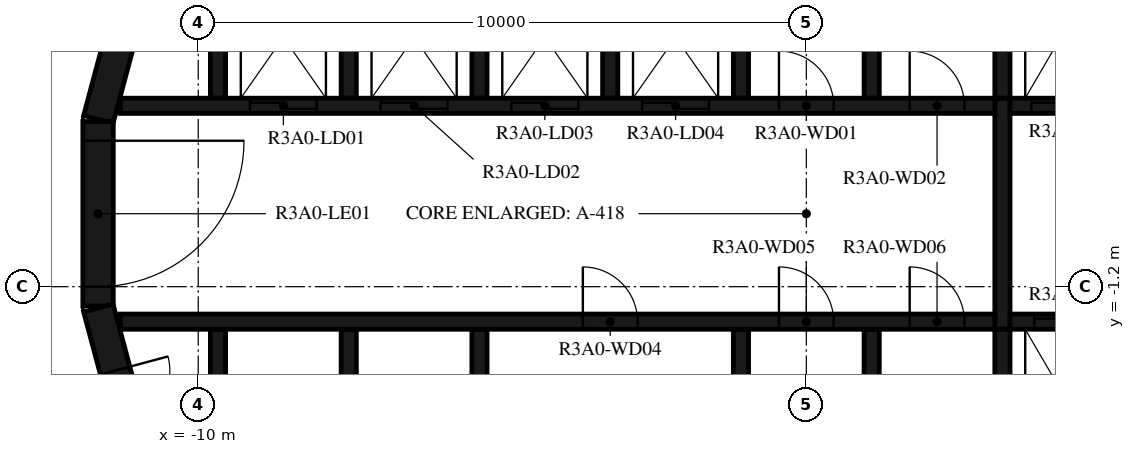
"""IFC4 building model, lengths in metres.
Left out: names, types, materials, properties, quantities, classifications, styles, units other than length and angle.
Written with IfcOpenShell. Run it as: python <this file> out.ifc"""

import sys

from ifc_helpers import new_model, si_unit, direction, frame, frame_2d, origin, place, context, subcontext, project, spatial, polyline, rectangle, outline, extrude, element, fill, save


model = new_model("IFC4")
c1 = context("Model", 3, precision=1e-05, world=origin(), true_north=direction((0.0, 1.0)))
c2 = subcontext(c1, "Body", "Model", "MODEL_VIEW")
j1 = project(units=[si_unit("LENGTHUNIT", "METRE"), si_unit("PLANEANGLEUNIT", "RADIAN")], contexts=[c1])
p1 = place(None, origin())
s1 = spatial("IfcSite", under=j1, at=p1, CompositionType="ELEMENT")
p2 = place(p1, origin())
s2 = spatial("IfcBuilding", under=s1, at=p2, CompositionType="ELEMENT")
p3 = place(p2, frame((0.0, 0.0, 120.4)))
s3 = spatial("IfcBuildingStorey", under=s2, at=p3, CompositionType="ELEMENT", Elevation=120.4)
p4 = place(p3, frame((-10.858, 4.479, 0.0), z_axis=(0.0, 0.0, 1.0), x_axis=(-0.258734743916, -0.965948410781, 0.0)))
e1 = element("IfcWall", 1, at=p4, inside=s3, PredefinedType="SHEAR", context=c2, shape_type="SweptSolid", body=[
    extrude(rectangle(XDim=3.033, YDim=0.5, at=frame_2d((1.516, 0.0))), origin(), (0.0, 0.0, 1.0), 3.12),
])
p5 = place(p3, frame((-11.647, 1.516, 0.0), z_axis=(0.0, 0.0, 1.0), x_axis=(0.0, -1.0, 0.0)))
e2 = element("IfcWall", 2, at=p5, inside=s3, PredefinedType="SHEAR", context=c2, shape_type="SweptSolid", body=[
    extrude(rectangle(XDim=3.033, YDim=0.5, at=frame_2d((1.516, 0.0))), origin(), (0.0, 0.0, 1.0), 3.12),
])
p6 = place(p5, frame((0.316, 0.0, 0.0)))
e3 = element("IfcOpeningElement", 3, at=p6, cuts=e2, PredefinedType="OPENING", context=c2, shape_type="SweptSolid", body=[
    extrude(rectangle(XDim=2.4, YDim=2.1, at=frame_2d((1.2, 1.05))), frame((0.0, 0.26, 0.0), z_axis=(0.0, -1.0, 0.0), x_axis=(1.0, 0.0, 0.0)), (0.0, 0.0, 1.0), 0.52),
])
p7 = place(p3, frame((-11.643, -1.55, 0.0), z_axis=(0.0, 0.0, 1.0), x_axis=(0.258734743916, -0.965948410781, 0.0)))
e4 = element("IfcWall", 4, at=p7, inside=s3, PredefinedType="SHEAR", context=c2, shape_type="SweptSolid", body=[
    extrude(rectangle(XDim=3.033, YDim=0.5, at=frame_2d((1.516, 0.0))), origin(), (0.0, 0.0, 1.0), 3.12),
])
p8 = place(p7, frame((1.066, 0.0, 0.0)))
e5 = element("IfcOpeningElement", 5, at=p8, cuts=e4, PredefinedType="OPENING", context=c2, shape_type="SweptSolid", body=[
    extrude(rectangle(XDim=0.9, YDim=2.1, at=frame_2d((0.45, 1.05))), frame((0.0, 0.26, 0.0), z_axis=(0.0, -1.0, 0.0), x_axis=(1.0, 0.0, 0.0)), (0.0, 0.0, 1.0), 0.52),
])
p9 = place(p3, origin())
e6 = element("IfcWall", 6, at=p9, inside=s3, PredefinedType="SHEAR", context=c2, shape_type="SweptSolid", body=[
    extrude(outline(polyline([(-9.55, 4.8), (-7.65, 4.8), (-7.65, 1.9), (-7.4, 1.9), (-7.4, 4.8), (-5.5, 4.8), (-5.5, 1.9), (-5.25, 1.9), (-5.25, 4.8), (-3.35, 4.8), (-3.35, 1.9), (-3.1, 1.9), (-3.1, 4.8), (-1.2, 4.8), (-1.2, 1.9), (-0.95, 1.9), (-0.95, 4.8), (0.95, 4.8), (0.95, 1.9), (1.2, 1.9), (1.2, 4.8), (3.1, 4.8), (3.1, 1.9), (3.35, 1.9), (3.35, 4.8), (5.25, 4.8), (5.25, 1.9), (5.5, 1.9), (5.5, 4.8), (7.4, 4.8), (7.4, 1.9), (7.65, 1.9), (7.65, 4.8), (9.55, 4.8), (9.55, 1.9), (9.8, 1.9), (9.8, 4.8), (9.8, 5.05), (-9.8, 5.05), (-9.8, 4.8), (-9.8, 1.9), (-9.55, 1.9), (-9.55, 4.8)])), origin(), (0.0, 0.0, 1.0), 3.12),
])
p10 = place(p3, origin())
e7 = element("IfcWall", 7, at=p10, inside=s3, PredefinedType="SHEAR", context=c2, shape_type="SweptSolid", body=[
    extrude(outline(polyline([(9.8, -5.05), (9.8, -4.8), (9.8, -1.9), (9.55, -1.9), (9.55, -4.8), (7.65, -4.8), (7.65, -1.9), (7.4, -1.9), (7.4, -4.8), (5.5, -4.8), (5.5, -1.9), (5.25, -1.9), (5.25, -4.8), (3.35, -4.8), (3.35, -1.9), (3.1, -1.9), (3.1, -4.8), (1.2, -4.8), (1.2, -1.9), (0.95, -1.9), (0.95, -4.8), (-0.95, -4.8), (-0.95, -1.9), (-1.2, -1.9), (-1.2, -4.8), (-5.25, -4.8), (-5.25, -1.9), (-5.5, -1.9), (-5.5, -4.8), (-7.4, -4.8), (-7.4, -1.9), (-7.65, -1.9), (-7.65, -4.8), (-9.55, -4.8), (-9.55, -1.9), (-9.8, -1.9), (-9.8, -4.8), (-9.8, -5.05), (9.8, -5.05)])), origin(), (0.0, 0.0, 1.0), 3.12),
])
p11 = place(p3, frame((-11.28, 1.775, 0.0), z_axis=(0.0, 0.0, 1.0), x_axis=(1.0, 0.0, 0.0)))
e8 = element("IfcWall", 8, at=p11, inside=s3, PredefinedType="SHEAR", context=c2, shape_type="SweptSolid", body=[
    extrude(rectangle(XDim=14.38, YDim=0.25, at=frame_2d((7.19, 0.0))), origin(), (0.0, 0.0, 1.0), 3.12),
])
p12 = place(p11, frame((2.13, 0.0, 0.0)))
e9 = element("IfcOpeningElement", 9, at=p12, cuts=e8, PredefinedType="OPENING", context=c2, shape_type="SweptSolid", body=[
    extrude(rectangle(XDim=1.1, YDim=2.1, at=frame_2d((0.55, 1.05))), frame((0.0, 0.135, 0.0), z_axis=(0.0, -1.0, 0.0), x_axis=(1.0, 0.0, 0.0)), (0.0, 0.0, 1.0), 0.27),
])
p13 = place(p11, frame((4.28, 0.0, 0.0)))
e10 = element("IfcOpeningElement", 10, at=p13, cuts=e8, PredefinedType="OPENING", context=c2, shape_type="SweptSolid", body=[
    extrude(rectangle(XDim=1.1, YDim=2.1, at=frame_2d((0.55, 1.05))), frame((0.0, 0.135, 0.0), z_axis=(0.0, -1.0, 0.0), x_axis=(1.0, 0.0, 0.0)), (0.0, 0.0, 1.0), 0.27),
])
p14 = place(p11, frame((6.43, 0.0, 0.0)))
e11 = element("IfcOpeningElement", 11, at=p14, cuts=e8, PredefinedType="OPENING", context=c2, shape_type="SweptSolid", body=[
    extrude(rectangle(XDim=1.1, YDim=2.1, at=frame_2d((0.55, 1.05))), frame((0.0, 0.135, 0.0), z_axis=(0.0, -1.0, 0.0), x_axis=(1.0, 0.0, 0.0)), (0.0, 0.0, 1.0), 0.27),
])
p15 = place(p11, frame((8.58, 0.0, 0.0)))
e12 = element("IfcOpeningElement", 12, at=p15, cuts=e8, PredefinedType="OPENING", context=c2, shape_type="SweptSolid", body=[
    extrude(rectangle(XDim=1.1, YDim=2.1, at=frame_2d((0.55, 1.05))), frame((0.0, 0.135, 0.0), z_axis=(0.0, -1.0, 0.0), x_axis=(1.0, 0.0, 0.0)), (0.0, 0.0, 1.0), 0.27),
])
p16 = place(p11, frame((10.83, 0.0, 0.0)))
e13 = element("IfcOpeningElement", 13, at=p16, cuts=e8, PredefinedType="OPENING", context=c2, shape_type="SweptSolid", body=[
    extrude(rectangle(XDim=0.9, YDim=2.1, at=frame_2d((0.45, 1.05))), frame((0.0, 0.135, 0.0), z_axis=(0.0, -1.0, 0.0), x_axis=(1.0, 0.0, 0.0)), (0.0, 0.0, 1.0), 0.27),
])
p17 = place(p11, frame((12.98, 0.0, 0.0)))
e14 = element("IfcOpeningElement", 14, at=p17, cuts=e8, PredefinedType="OPENING", context=c2, shape_type="SweptSolid", body=[
    extrude(rectangle(XDim=0.9, YDim=2.1, at=frame_2d((0.45, 1.05))), frame((0.0, 0.135, 0.0), z_axis=(0.0, -1.0, 0.0), x_axis=(1.0, 0.0, 0.0)), (0.0, 0.0, 1.0), 0.27),
])
p18 = place(p3, frame((3.35, 1.775, 0.0), z_axis=(0.0, 0.0, 1.0), x_axis=(1.0, 0.0, 0.0)))
e15 = element("IfcWall", 15, at=p18, inside=s3, PredefinedType="SHEAR", context=c2, shape_type="SweptSolid", body=[
    extrude(rectangle(XDim=7.93, YDim=0.25, at=frame_2d((3.965, 0.0))), origin(), (0.0, 0.0, 1.0), 3.12),
])
p19 = place(p18, frame((0.35, 0.0, 0.0)))
e16 = element("IfcOpeningElement", 16, at=p19, cuts=e15, PredefinedType="OPENING", context=c2, shape_type="SweptSolid", body=[
    extrude(rectangle(XDim=1.2, YDim=2.4, at=frame_2d((0.6, 1.2))), frame((0.0, 0.135, 0.0), z_axis=(0.0, -1.0, 0.0), x_axis=(1.0, 0.0, 0.0)), (0.0, 0.0, 1.0), 0.27),
])
p20 = place(p18, frame((2.5, 0.0, 0.0)))
e17 = element("IfcOpeningElement", 17, at=p20, cuts=e15, PredefinedType="OPENING", context=c2, shape_type="SweptSolid", body=[
    extrude(rectangle(XDim=1.2, YDim=2.4, at=frame_2d((0.6, 1.2))), frame((0.0, 0.135, 0.0), z_axis=(0.0, -1.0, 0.0), x_axis=(1.0, 0.0, 0.0)), (0.0, 0.0, 1.0), 0.27),
])
p21 = place(p18, frame((4.8, 0.0, 0.0)))
e18 = element("IfcOpeningElement", 18, at=p21, cuts=e15, PredefinedType="OPENING", context=c2, shape_type="SweptSolid", body=[
    extrude(rectangle(XDim=0.9, YDim=2.1, at=frame_2d((0.45, 1.05))), frame((0.0, 0.135, 0.0), z_axis=(0.0, -1.0, 0.0), x_axis=(1.0, 0.0, 0.0)), (0.0, 0.0, 1.0), 0.27),
])
p22 = place(p3, frame((-11.28, -1.775, 0.0), z_axis=(0.0, 0.0, 1.0), x_axis=(1.0, 0.0, 0.0)))
e19 = element("IfcWall", 19, at=p22, inside=s3, PredefinedType="SHEAR", context=c2, shape_type="SweptSolid", body=[
    extrude(rectangle(XDim=14.38, YDim=0.25, at=frame_2d((7.19, 0.0))), origin(), (0.0, 0.0, 1.0), 3.12),
])
p23 = place(p22, frame((7.605, 0.0, 0.0)))
e20 = element("IfcOpeningElement", 20, at=p23, cuts=e19, PredefinedType="OPENING", context=c2, shape_type="SweptSolid", body=[
    extrude(rectangle(XDim=0.9, YDim=2.1, at=frame_2d((0.45, 1.05))), frame((0.0, 0.135, 0.0), z_axis=(0.0, -1.0, 0.0), x_axis=(1.0, 0.0, 0.0)), (0.0, 0.0, 1.0), 0.27),
])
p24 = place(p22, frame((10.83, 0.0, 0.0)))
e21 = element("IfcOpeningElement", 21, at=p24, cuts=e19, PredefinedType="OPENING", context=c2, shape_type="SweptSolid", body=[
    extrude(rectangle(XDim=0.9, YDim=2.1, at=frame_2d((0.45, 1.05))), frame((0.0, 0.135, 0.0), z_axis=(0.0, -1.0, 0.0), x_axis=(1.0, 0.0, 0.0)), (0.0, 0.0, 1.0), 0.27),
])
p25 = place(p22, frame((12.98, 0.0, 0.0)))
e22 = element("IfcOpeningElement", 22, at=p25, cuts=e19, PredefinedType="OPENING", context=c2, shape_type="SweptSolid", body=[
    extrude(rectangle(XDim=0.9, YDim=2.1, at=frame_2d((0.45, 1.05))), frame((0.0, 0.135, 0.0), z_axis=(0.0, -1.0, 0.0), x_axis=(1.0, 0.0, 0.0)), (0.0, 0.0, 1.0), 0.27),
])
p26 = place(p3, frame((3.35, -1.775, 0.0), z_axis=(0.0, 0.0, 1.0), x_axis=(1.0, 0.0, 0.0)))
e23 = element("IfcWall", 23, at=p26, inside=s3, PredefinedType="SHEAR", context=c2, shape_type="SweptSolid", body=[
    extrude(rectangle(XDim=7.93, YDim=0.25, at=frame_2d((3.965, 0.0))), origin(), (0.0, 0.0, 1.0), 3.12),
])
p27 = place(p26, frame((0.4, 0.0, 0.0)))
e24 = element("IfcOpeningElement", 24, at=p27, cuts=e23, PredefinedType="OPENING", context=c2, shape_type="SweptSolid", body=[
    extrude(rectangle(XDim=1.1, YDim=2.4, at=frame_2d((0.55, 1.2))), frame((0.0, 0.135, 0.0), z_axis=(0.0, -1.0, 0.0), x_axis=(1.0, 0.0, 0.0)), (0.0, 0.0, 1.0), 0.27),
])
p28 = place(p26, frame((2.55, 0.0, 0.0)))
e25 = element("IfcOpeningElement", 25, at=p28, cuts=e23, PredefinedType="OPENING", context=c2, shape_type="SweptSolid", body=[
    extrude(rectangle(XDim=1.1, YDim=2.4, at=frame_2d((0.55, 1.2))), frame((0.0, 0.135, 0.0), z_axis=(0.0, -1.0, 0.0), x_axis=(1.0, 0.0, 0.0)), (0.0, 0.0, 1.0), 0.27),
])
p29 = place(p26, frame((4.7, 0.0, 0.0)))
e26 = element("IfcOpeningElement", 26, at=p29, cuts=e23, PredefinedType="OPENING", context=c2, shape_type="SweptSolid", body=[
    extrude(rectangle(XDim=1.1, YDim=2.4, at=frame_2d((0.55, 1.2))), frame((0.0, 0.135, 0.0), z_axis=(0.0, -1.0, 0.0), x_axis=(1.0, 0.0, 0.0)), (0.0, 0.0, 1.0), 0.27),
])
p30 = place(p3, frame((3.225, -1.9, 0.0), z_axis=(0.0, 0.0, 1.0), x_axis=(0.0, 1.0, 0.0)))
e27 = element("IfcWall", 27, at=p30, inside=s3, PredefinedType="SHEAR", context=c2, shape_type="SweptSolid", body=[
    extrude(rectangle(XDim=3.8, YDim=0.25, at=frame_2d((1.9, 0.0))), origin(), (0.0, 0.0, 1.0), 3.12),
])
p31 = place(p3, frame((-12.028, 7.516, 0.0), z_axis=(0.0, 0.0, 1.0), x_axis=(-0.292365533182, -0.956306642771, 0.0)))
e28 = element("IfcWall", 28, at=p31, inside=s3, PredefinedType="STANDARD", context=c2, shape_type="SweptSolid", body=[
    extrude(rectangle(XDim=7.342, YDim=0.2, at=frame_2d((3.671, 0.0))), origin(), (0.0, 0.0, 1.0), 3.12),
])
p32 = place(p31, frame((2.533, 0.0, 0.0)))
e29 = element("IfcOpeningElement", 29, at=p32, cuts=e28, PredefinedType="OPENING", context=c2, shape_type="SweptSolid", body=[
    extrude(rectangle(XDim=1.0, YDim=2.1, at=frame_2d((0.5, 1.05))), frame((0.0, 0.11, 0.0), z_axis=(0.0, -1.0, 0.0), x_axis=(1.0, 0.0, 0.0)), (0.0, 0.0, 1.0), 0.22),
])
p33 = place(p6, origin())
e30 = element("IfcDoor", 30, at=p33, inside=s3, OperationType="DOUBLE_DOOR_SINGLE_SWING", PredefinedType="DOOR", context=c2, shape_type="SweptSolid", body=[
    extrude(rectangle(XDim=2.4, YDim=2.1, at=frame_2d((1.2, 1.05))), frame((0.0, 0.025, 0.0), z_axis=(0.0, -1.0, 0.0), x_axis=(1.0, 0.0, 0.0)), (0.0, 0.0, 1.0), 0.05),
])
fill(e3, e30)
p34 = place(p12, origin())
e31 = element("IfcDoor", 31, at=p34, inside=s3, OperationType="DOUBLE_DOOR_SLIDING", PredefinedType="DOOR", context=c2, shape_type="SweptSolid", body=[
    extrude(rectangle(XDim=1.1, YDim=2.1, at=frame_2d((0.55, 1.05))), frame((0.0, 0.025, 0.0), z_axis=(0.0, -1.0, 0.0), x_axis=(1.0, 0.0, 0.0)), (0.0, 0.0, 1.0), 0.05),
])
fill(e9, e31)
p35 = place(p13, origin())
e32 = element("IfcDoor", 32, at=p35, inside=s3, OperationType="DOUBLE_DOOR_SLIDING", PredefinedType="DOOR", context=c2, shape_type="SweptSolid", body=[
    extrude(rectangle(XDim=1.1, YDim=2.1, at=frame_2d((0.55, 1.05))), frame((0.0, 0.025, 0.0), z_axis=(0.0, -1.0, 0.0), x_axis=(1.0, 0.0, 0.0)), (0.0, 0.0, 1.0), 0.05),
])
fill(e10, e32)
p36 = place(p14, origin())
e33 = element("IfcDoor", 33, at=p36, inside=s3, OperationType="DOUBLE_DOOR_SLIDING", PredefinedType="DOOR", context=c2, shape_type="SweptSolid", body=[
    extrude(rectangle(XDim=1.1, YDim=2.1, at=frame_2d((0.55, 1.05))), frame((0.0, 0.025, 0.0), z_axis=(0.0, -1.0, 0.0), x_axis=(1.0, 0.0, 0.0)), (0.0, 0.0, 1.0), 0.05),
])
fill(e11, e33)
p37 = place(p15, origin())
e34 = element("IfcDoor", 34, at=p37, inside=s3, OperationType="DOUBLE_DOOR_SLIDING", PredefinedType="DOOR", context=c2, shape_type="SweptSolid", body=[
    extrude(rectangle(XDim=1.1, YDim=2.1, at=frame_2d((0.55, 1.05))), frame((0.0, 0.025, 0.0), z_axis=(0.0, -1.0, 0.0), x_axis=(1.0, 0.0, 0.0)), (0.0, 0.0, 1.0), 0.05),
])
fill(e12, e34)
p38 = place(p19, origin())
e35 = element("IfcDoor", 35, at=p38, inside=s3, OperationType="DOUBLE_DOOR_SLIDING", PredefinedType="DOOR", context=c2, shape_type="SweptSolid", body=[
    extrude(rectangle(XDim=1.2, YDim=2.4, at=frame_2d((0.6, 1.2))), frame((0.0, 0.025, 0.0), z_axis=(0.0, -1.0, 0.0), x_axis=(1.0, 0.0, 0.0)), (0.0, 0.0, 1.0), 0.05),
])
fill(e16, e35)
p39 = place(p27, origin())
e36 = element("IfcDoor", 36, at=p39, inside=s3, OperationType="DOUBLE_DOOR_SLIDING", PredefinedType="DOOR", context=c2, shape_type="SweptSolid", body=[
    extrude(rectangle(XDim=1.1, YDim=2.4, at=frame_2d((0.55, 1.2))), frame((0.0, 0.025, 0.0), z_axis=(0.0, -1.0, 0.0), x_axis=(1.0, 0.0, 0.0)), (0.0, 0.0, 1.0), 0.05),
])
fill(e24, e36)
p40 = place(p16, origin())
e37 = element("IfcDoor", 37, at=p40, inside=s3, OperationType="SINGLE_SWING_RIGHT", PredefinedType="DOOR", context=c2, shape_type="SweptSolid", body=[
    extrude(rectangle(XDim=0.9, YDim=2.1, at=frame_2d((0.45, 1.05))), frame((0.0, 0.025, 0.0), z_axis=(0.0, -1.0, 0.0), x_axis=(1.0, 0.0, 0.0)), (0.0, 0.0, 1.0), 0.05),
])
fill(e13, e37)
p41 = place(p17, origin())
e38 = element("IfcDoor", 38, at=p41, inside=s3, OperationType="SINGLE_SWING_LEFT", PredefinedType="DOOR", context=c2, shape_type="SweptSolid", body=[
    extrude(rectangle(XDim=0.9, YDim=2.1, at=frame_2d((0.45, 1.05))), frame((0.0, 0.025, 0.0), z_axis=(0.0, -1.0, 0.0), x_axis=(1.0, 0.0, 0.0)), (0.0, 0.0, 1.0), 0.05),
])
fill(e14, e38)
p42 = place(p23, origin())
e39 = element("IfcDoor", 39, at=p42, inside=s3, OperationType="SINGLE_SWING_LEFT", PredefinedType="DOOR", context=c2, shape_type="SweptSolid", body=[
    extrude(rectangle(XDim=0.9, YDim=2.1, at=frame_2d((0.45, 1.05))), frame((0.0, 0.025, 0.0), z_axis=(0.0, -1.0, 0.0), x_axis=(1.0, 0.0, 0.0)), (0.0, 0.0, 1.0), 0.05),
])
fill(e20, e39)
p43 = place(p24, origin())
e40 = element("IfcDoor", 40, at=p43, inside=s3, OperationType="SINGLE_SWING_RIGHT", PredefinedType="DOOR", context=c2, shape_type="SweptSolid", body=[
    extrude(rectangle(XDim=0.9, YDim=2.1, at=frame_2d((0.45, 1.05))), frame((0.0, 0.025, 0.0), z_axis=(0.0, -1.0, 0.0), x_axis=(1.0, 0.0, 0.0)), (0.0, 0.0, 1.0), 0.05),
])
fill(e21, e40)
p44 = place(p25, origin())
e41 = element("IfcDoor", 41, at=p44, inside=s3, OperationType="SINGLE_SWING_LEFT", PredefinedType="DOOR", context=c2, shape_type="SweptSolid", body=[
    extrude(rectangle(XDim=0.9, YDim=2.1, at=frame_2d((0.45, 1.05))), frame((0.0, 0.025, 0.0), z_axis=(0.0, -1.0, 0.0), x_axis=(1.0, 0.0, 0.0)), (0.0, 0.0, 1.0), 0.05),
])
fill(e22, e41)
p45 = place(p8, origin())
e42 = element("IfcDoor", 42, at=p45, inside=s3, OperationType="SINGLE_SWING_RIGHT", PredefinedType="DOOR", context=c2, shape_type="SweptSolid", body=[
    extrude(rectangle(XDim=0.9, YDim=2.1, at=frame_2d((0.45, 1.05))), frame((0.0, 0.025, 0.0), z_axis=(0.0, -1.0, 0.0), x_axis=(1.0, 0.0, 0.0)), (0.0, 0.0, 1.0), 0.05),
])
fill(e5, e42)
save(model, sys.argv[1])
